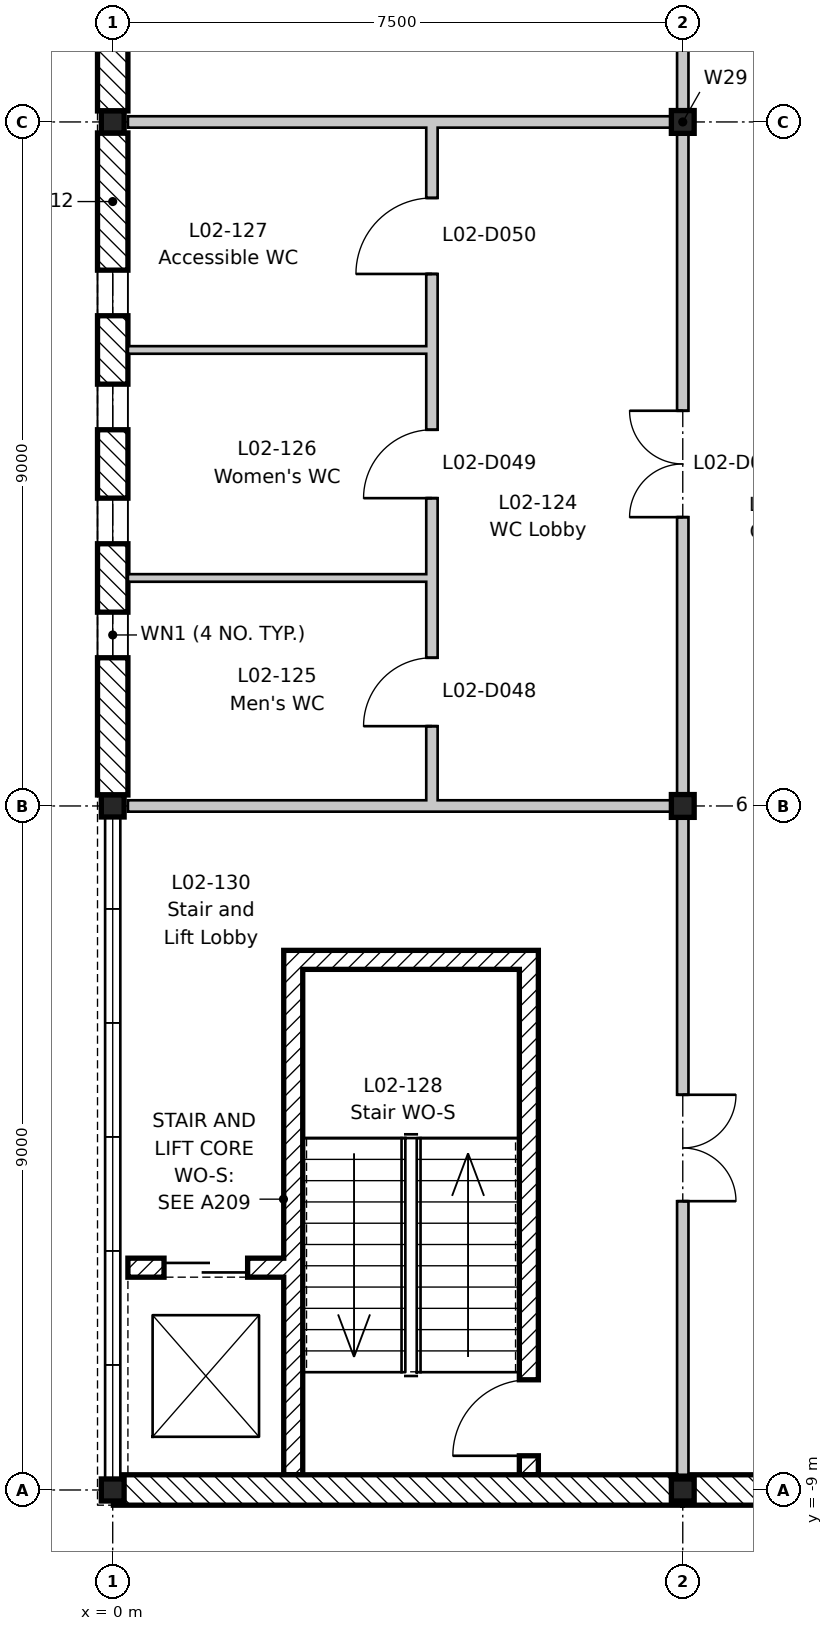
"""IFC4 building model, lengths in metres.
Left out: names, types, materials, properties, quantities, classifications, styles, units other than length and angle.
Written with IfcOpenShell. Run it as: python <this file> out.ifc"""

import sys

from ifc_helpers import new_model, si_unit, direction, frame, frame_2d, origin, origin_2d, place, context, subcontext, project, spatial, rectangle, i_section, extrude, element, fill, save


model = new_model("IFC4")
c1 = context("Model", 3, precision=1e-05, world=origin(), true_north=direction((0.0, 1.0)))
c2 = subcontext(c1, "Body", "Model", "MODEL_VIEW")
j1 = project(units=[si_unit("LENGTHUNIT", "METRE"), si_unit("PLANEANGLEUNIT", "RADIAN")], contexts=[c1])
p1 = place(None, origin())
s1 = spatial("IfcSite", under=j1, at=p1, CompositionType="ELEMENT")
p2 = place(p1, origin())
s2 = spatial("IfcBuilding", under=s1, at=p2, CompositionType="ELEMENT")
p3 = place(p2, frame((0.0, 0.0, 9.9)))
s3 = spatial("IfcBuildingStorey", under=s2, at=p3, CompositionType="ELEMENT", Elevation=9.9)
for number, where, z_axis, x_axis in (
    (1, (0.0, -9.0, -0.2), (0.0, 0.0, 1.0), (1.0, 0.0, 0.0)),
    (2, (0.0, 0.0, -0.2), (0.0, 0.0, 1.0), (1.0, 0.0, 0.0)),
    (3, (0.0, 9.0, -0.2), (0.0, 0.0, 1.0), (1.0, 0.0, 0.0)),
    (4, (7.5, -9.0, -0.2), (0.0, 0.0, 1.0), (1.0, 0.0, 0.0)),
):
    element("IfcColumn", number, at=place(p3, frame(where, z_axis=z_axis, x_axis=x_axis)), inside=s3, PredefinedType="COLUMN", context=c2, shape_type="SweptSolid", body=[
        extrude(i_section(OverallWidth=0.3, OverallDepth=0.29, WebThickness=0.009, FlangeThickness=0.014, FilletRadius=0.027, at=origin_2d()), origin(), (0.0, 0.0, 1.0), 4.5),
    ])
for number, where, z_axis, x_axis in (
    (5, (7.5, 0.0, -0.2), (0.0, 0.0, 1.0), (1.0, 0.0, 0.0)),
    (6, (7.5, 9.0, -0.2), (0.0, 0.0, 1.0), (1.0, 0.0, 0.0)),
):
    element("IfcColumn", number, at=place(p3, frame(where, z_axis=z_axis, x_axis=x_axis)), inside=s3, PredefinedType="COLUMN", context=c2, shape_type="SweptSolid", body=[
        extrude(i_section(OverallWidth=0.3, OverallDepth=0.3, WebThickness=0.011, FlangeThickness=0.019, FilletRadius=0.027, at=origin_2d()), origin(), (0.0, 0.0, 1.0), 4.5),
    ])
p4 = place(p3, frame((2.375, -8.8, 0.0), z_axis=(0.0, 0.0, 1.0), x_axis=(0.0, 1.0, 0.0)))
e7 = element("IfcWall", 7, at=p4, inside=s3, PredefinedType="SHEAR", context=c2, shape_type="SweptSolid", body=[
    extrude(rectangle(XDim=6.9, YDim=0.25, at=frame_2d((3.45, 0.0))), origin(), (0.0, 0.0, 1.0), 4.3),
])
p5 = place(p3, frame((5.475, -8.8, 0.0), z_axis=(0.0, 0.0, 1.0), x_axis=(0.0, 1.0, 0.0)))
e8 = element("IfcWall", 8, at=p5, inside=s3, PredefinedType="SHEAR", context=c2, shape_type="SweptSolid", body=[
    extrude(rectangle(XDim=6.9, YDim=0.25, at=frame_2d((3.45, 0.0))), origin(), (0.0, 0.0, 1.0), 4.3),
])
p6 = place(p5, frame((0.25, 0.0, 0.0)))
e9 = element("IfcOpeningElement", 9, at=p6, cuts=e8, PredefinedType="OPENING", context=c2, shape_type="SweptSolid", body=[
    extrude(rectangle(XDim=1.0, YDim=2.1, at=frame_2d((0.5, 1.05))), frame((0.0, 0.135, 0.0), z_axis=(0.0, -1.0, 0.0), x_axis=(1.0, 0.0, 0.0)), (0.0, 0.0, 1.0), 0.27),
])
p7 = place(p3, frame((2.5, -2.025, 0.0), z_axis=(0.0, 0.0, 1.0), x_axis=(1.0, 0.0, 0.0)))
e10 = element("IfcWall", 10, at=p7, inside=s3, PredefinedType="SHEAR", context=c2, shape_type="SweptSolid", body=[
    extrude(rectangle(XDim=2.85, YDim=0.25, at=frame_2d((1.425, 0.0))), origin(), (0.0, 0.0, 1.0), 4.3),
])
p8 = place(p3, frame((0.2, -6.075, 0.0), z_axis=(0.0, 0.0, 1.0), x_axis=(1.0, 0.0, 0.0)))
e11 = element("IfcWall", 11, at=p8, inside=s3, PredefinedType="SHEAR", context=c2, shape_type="SweptSolid", body=[
    extrude(rectangle(XDim=2.05, YDim=0.25, at=frame_2d((1.025, 0.0))), origin(), (0.0, 0.0, 1.0), 4.3),
])
p9 = place(p8, frame((0.475, 0.0, 0.0)))
e12 = element("IfcOpeningElement", 12, at=p9, cuts=e11, PredefinedType="OPENING", context=c2, shape_type="SweptSolid", body=[
    extrude(rectangle(XDim=1.1, YDim=2.1, at=frame_2d((0.55, 1.05))), frame((0.0, 0.135, 0.0), z_axis=(0.0, -1.0, 0.0), x_axis=(1.0, 0.0, 0.0)), (0.0, 0.0, 1.0), 0.27),
])
p10 = place(p3, frame((0.0, 0.145, 0.0), z_axis=(0.0, 0.0, 1.0), x_axis=(0.0, 1.0, 0.0)))
e13 = element("IfcWall", 13, at=p10, inside=s3, PredefinedType="STANDARD", context=c2, shape_type="SweptSolid", body=[
    extrude(rectangle(XDim=8.71, YDim=0.4, at=frame_2d((4.355, 0.0))), origin(), (0.0, 0.0, 1.0), 3.9),
])
p11 = place(p10, frame((1.805, 0.0, 1.5)))
e14 = element("IfcOpeningElement", 14, at=p11, cuts=e13, PredefinedType="OPENING", context=c2, shape_type="SweptSolid", body=[
    extrude(rectangle(XDim=0.6, YDim=1.2, at=frame_2d((0.3, 0.6))), frame((0.0, 0.21, 0.0), z_axis=(0.0, -1.0, 0.0), x_axis=(1.0, 0.0, 0.0)), (0.0, 0.0, 1.0), 0.42),
])
p12 = place(p10, frame((3.305, 0.0, 1.5)))
e15 = element("IfcOpeningElement", 15, at=p12, cuts=e13, PredefinedType="OPENING", context=c2, shape_type="SweptSolid", body=[
    extrude(rectangle(XDim=0.6, YDim=1.2, at=frame_2d((0.3, 0.6))), frame((0.0, 0.21, 0.0), z_axis=(0.0, -1.0, 0.0), x_axis=(1.0, 0.0, 0.0)), (0.0, 0.0, 1.0), 0.42),
])
p13 = place(p10, frame((4.805, 0.0, 1.5)))
e16 = element("IfcOpeningElement", 16, at=p13, cuts=e13, PredefinedType="OPENING", context=c2, shape_type="SweptSolid", body=[
    extrude(rectangle(XDim=0.6, YDim=1.2, at=frame_2d((0.3, 0.6))), frame((0.0, 0.21, 0.0), z_axis=(0.0, -1.0, 0.0), x_axis=(1.0, 0.0, 0.0)), (0.0, 0.0, 1.0), 0.42),
])
p14 = place(p10, frame((6.305, 0.0, 1.5)))
e17 = element("IfcOpeningElement", 17, at=p14, cuts=e13, PredefinedType="OPENING", context=c2, shape_type="SweptSolid", body=[
    extrude(rectangle(XDim=0.6, YDim=1.2, at=frame_2d((0.3, 0.6))), frame((0.0, 0.21, 0.0), z_axis=(0.0, -1.0, 0.0), x_axis=(1.0, 0.0, 0.0)), (0.0, 0.0, 1.0), 0.42),
])
p15 = place(p3, frame((0.0, 9.145, 0.0), z_axis=(0.0, 0.0, 1.0), x_axis=(0.0, 1.0, 0.0)))
e18 = element("IfcWall", 18, at=p15, inside=s3, PredefinedType="STANDARD", context=c2, shape_type="SweptSolid", body=[
    extrude(rectangle(XDim=8.71, YDim=0.4, at=frame_2d((4.355, 0.0))), origin(), (0.0, 0.0, 1.0), 3.9),
])
p16 = place(p15, frame((1.505, 0.0, 0.6)))
e19 = element("IfcOpeningElement", 19, at=p16, cuts=e18, PredefinedType="OPENING", context=c2, shape_type="SweptSolid", body=[
    extrude(rectangle(XDim=1.2, YDim=3.0, at=frame_2d((0.6, 1.5))), frame((0.0, 0.21, 0.0), z_axis=(0.0, -1.0, 0.0), x_axis=(1.0, 0.0, 0.0)), (0.0, 0.0, 1.0), 0.42),
])
p17 = place(p15, frame((3.005, 0.0, 0.6)))
e20 = element("IfcOpeningElement", 20, at=p17, cuts=e18, PredefinedType="OPENING", context=c2, shape_type="SweptSolid", body=[
    extrude(rectangle(XDim=1.2, YDim=3.0, at=frame_2d((0.6, 1.5))), frame((0.0, 0.21, 0.0), z_axis=(0.0, -1.0, 0.0), x_axis=(1.0, 0.0, 0.0)), (0.0, 0.0, 1.0), 0.42),
])
p18 = place(p15, frame((4.505, 0.0, 0.6)))
e21 = element("IfcOpeningElement", 21, at=p18, cuts=e18, PredefinedType="OPENING", context=c2, shape_type="SweptSolid", body=[
    extrude(rectangle(XDim=1.2, YDim=3.0, at=frame_2d((0.6, 1.5))), frame((0.0, 0.21, 0.0), z_axis=(0.0, -1.0, 0.0), x_axis=(1.0, 0.0, 0.0)), (0.0, 0.0, 1.0), 0.42),
])
p19 = place(p15, frame((6.005, 0.0, 0.6)))
e22 = element("IfcOpeningElement", 22, at=p19, cuts=e18, PredefinedType="OPENING", context=c2, shape_type="SweptSolid", body=[
    extrude(rectangle(XDim=1.2, YDim=3.0, at=frame_2d((0.6, 1.5))), frame((0.0, 0.21, 0.0), z_axis=(0.0, -1.0, 0.0), x_axis=(1.0, 0.0, 0.0)), (0.0, 0.0, 1.0), 0.42),
])
p20 = place(p3, frame((7.491, -9.0, 0.0), z_axis=(0.0, 0.0, 1.0), x_axis=(-1.0, 0.0, 0.0)))
e23 = element("IfcWall", 23, at=p20, inside=s3, PredefinedType="STANDARD", context=c2, shape_type="SweptSolid", body=[
    extrude(rectangle(XDim=7.481, YDim=0.4, at=frame_2d((3.741, 0.0))), origin(), (0.0, 0.0, 1.0), 3.97),
])
p21 = place(p3, frame((10.491, -9.0, 0.0), z_axis=(0.0, 0.0, 1.0), x_axis=(-1.0, 0.0, 0.0)))
e24 = element("IfcWall", 24, at=p21, inside=s3, PredefinedType="STANDARD", context=c2, shape_type="SweptSolid", body=[
    extrude(rectangle(XDim=2.981, YDim=0.4, at=frame_2d((1.491, 0.0))), origin(), (0.0, 0.0, 1.0), 4.1),
])
for number, where, z_axis, x_axis in (
    (25, (0.2, 9.0, 0.0), (0.0, 0.0, 1.0), (1.0, 0.0, 0.0)),
    (26, (0.2, 0.0, 0.0), (0.0, 0.0, 1.0), (1.0, 0.0, 0.0)),
):
    element("IfcWall", number, at=place(p3, frame(where, z_axis=z_axis, x_axis=x_axis)), inside=s3, PredefinedType="PARTITIONING", context=c2, shape_type="SweptSolid", body=[
        extrude(rectangle(XDim=7.225, YDim=0.15, at=frame_2d((3.613, 0.0))), origin(), (0.0, 0.0, 1.0), 3.95),
    ])
p22 = place(p3, frame((7.5, -8.8, 0.0), z_axis=(0.0, 0.0, 1.0), x_axis=(0.0, 1.0, 0.0)))
e27 = element("IfcWall", 27, at=p22, inside=s3, PredefinedType="PARTITIONING", context=c2, shape_type="SweptSolid", body=[
    extrude(rectangle(XDim=79.3, YDim=0.15, at=frame_2d((39.65, 0.0))), origin(), (0.0, 0.0, 1.0), 3.78),
])
p23 = place(p22, frame((21.6, 0.0, 0.0)))
e28 = element("IfcOpeningElement", 28, at=p23, cuts=e27, PredefinedType="OPENING", context=c2, shape_type="SweptSolid", body=[
    extrude(rectangle(XDim=1.4, YDim=2.1, at=frame_2d((0.7, 1.05))), frame((0.0, 0.085, 0.0), z_axis=(0.0, -1.0, 0.0), x_axis=(1.0, 0.0, 0.0)), (0.0, 0.0, 1.0), 0.17),
])
p24 = place(p22, frame((29.3, 0.0, 0.0)))
e29 = element("IfcOpeningElement", 29, at=p24, cuts=e27, PredefinedType="OPENING", context=c2, shape_type="SweptSolid", body=[
    extrude(rectangle(XDim=1.0, YDim=2.1, at=frame_2d((0.5, 1.05))), frame((0.0, 0.085, 0.0), z_axis=(0.0, -1.0, 0.0), x_axis=(1.0, 0.0, 0.0)), (0.0, 0.0, 1.0), 0.17),
])
p25 = place(p22, frame((33.8, 0.0, 0.0)))
e30 = element("IfcOpeningElement", 30, at=p25, cuts=e27, PredefinedType="OPENING", context=c2, shape_type="SweptSolid", body=[
    extrude(rectangle(XDim=1.0, YDim=2.1, at=frame_2d((0.5, 1.05))), frame((0.0, 0.085, 0.0), z_axis=(0.0, -1.0, 0.0), x_axis=(1.0, 0.0, 0.0)), (0.0, 0.0, 1.0), 0.17),
])
p26 = place(p22, frame((48.6, 0.0, 0.0)))
e31 = element("IfcOpeningElement", 31, at=p26, cuts=e27, PredefinedType="OPENING", context=c2, shape_type="SweptSolid", body=[
    extrude(rectangle(XDim=1.4, YDim=2.1, at=frame_2d((0.7, 1.05))), frame((0.0, 0.085, 0.0), z_axis=(0.0, -1.0, 0.0), x_axis=(1.0, 0.0, 0.0)), (0.0, 0.0, 1.0), 0.17),
])
p27 = place(p22, frame((56.3, 0.0, 0.0)))
e32 = element("IfcOpeningElement", 32, at=p27, cuts=e27, PredefinedType="OPENING", context=c2, shape_type="SweptSolid", body=[
    extrude(rectangle(XDim=1.0, YDim=2.1, at=frame_2d((0.5, 1.05))), frame((0.0, 0.085, 0.0), z_axis=(0.0, -1.0, 0.0), x_axis=(1.0, 0.0, 0.0)), (0.0, 0.0, 1.0), 0.17),
])
p28 = place(p22, frame((60.8, 0.0, 0.0)))
e33 = element("IfcOpeningElement", 33, at=p28, cuts=e27, PredefinedType="OPENING", context=c2, shape_type="SweptSolid", body=[
    extrude(rectangle(XDim=1.0, YDim=2.1, at=frame_2d((0.5, 1.05))), frame((0.0, 0.085, 0.0), z_axis=(0.0, -1.0, 0.0), x_axis=(1.0, 0.0, 0.0)), (0.0, 0.0, 1.0), 0.17),
])
p29 = place(p22, frame((12.6, 0.0, 0.0)))
e34 = element("IfcOpeningElement", 34, at=p29, cuts=e27, PredefinedType="OPENING", context=c2, shape_type="SweptSolid", body=[
    extrude(rectangle(XDim=1.4, YDim=2.1, at=frame_2d((0.7, 1.05))), frame((0.0, 0.085, 0.0), z_axis=(0.0, -1.0, 0.0), x_axis=(1.0, 0.0, 0.0)), (0.0, 0.0, 1.0), 0.17),
])
p30 = place(p22, frame((3.6, 0.0, 0.0)))
e35 = element("IfcOpeningElement", 35, at=p30, cuts=e27, PredefinedType="OPENING", context=c2, shape_type="SweptSolid", body=[
    extrude(rectangle(XDim=1.4, YDim=2.1, at=frame_2d((0.7, 1.05))), frame((0.0, 0.085, 0.0), z_axis=(0.0, -1.0, 0.0), x_axis=(1.0, 0.0, 0.0)), (0.0, 0.0, 1.0), 0.17),
])
p31 = place(p22, frame((63.55, 0.0, 0.0)))
e36 = element("IfcOpeningElement", 36, at=p31, cuts=e27, PredefinedType="OPENING", context=c2, shape_type="SweptSolid", body=[
    extrude(rectangle(XDim=1.4, YDim=2.1, at=frame_2d((0.7, 1.05))), frame((0.0, 0.085, 0.0), z_axis=(0.0, -1.0, 0.0), x_axis=(1.0, 0.0, 0.0)), (0.0, 0.0, 1.0), 0.17),
])
p32 = place(p22, frame((69.6, 0.0, 0.0)))
e37 = element("IfcOpeningElement", 37, at=p32, cuts=e27, PredefinedType="OPENING", context=c2, shape_type="SweptSolid", body=[
    extrude(rectangle(XDim=1.4, YDim=2.1, at=frame_2d((0.7, 1.05))), frame((0.0, 0.085, 0.0), z_axis=(0.0, -1.0, 0.0), x_axis=(1.0, 0.0, 0.0)), (0.0, 0.0, 1.0), 0.17),
])
p33 = place(p22, frame((42.85, 0.0, 0.0)))
e38 = element("IfcOpeningElement", 38, at=p33, cuts=e27, PredefinedType="OPENING", context=c2, shape_type="SweptSolid", body=[
    extrude(rectangle(XDim=1.0, YDim=2.1, at=frame_2d((0.5, 1.05))), frame((0.0, 0.085, 0.0), z_axis=(0.0, -1.0, 0.0), x_axis=(1.0, 0.0, 0.0)), (0.0, 0.0, 1.0), 0.17),
])
p34 = place(p22, frame((36.55, 0.0, 0.0)))
e39 = element("IfcOpeningElement", 39, at=p34, cuts=e27, PredefinedType="OPENING", context=c2, shape_type="SweptSolid", body=[
    extrude(rectangle(XDim=1.4, YDim=2.1, at=frame_2d((0.7, 1.05))), frame((0.0, 0.085, 0.0), z_axis=(0.0, -1.0, 0.0), x_axis=(1.0, 0.0, 0.0)), (0.0, 0.0, 1.0), 0.17),
])
p35 = place(p22, frame((72.8, 0.0, 0.0)))
e40 = element("IfcOpeningElement", 40, at=p35, cuts=e27, PredefinedType="OPENING", context=c2, shape_type="SweptSolid", body=[
    extrude(rectangle(XDim=1.0, YDim=2.1, at=frame_2d((0.5, 1.05))), frame((0.0, 0.085, 0.0), z_axis=(0.0, -1.0, 0.0), x_axis=(1.0, 0.0, 0.0)), (0.0, 0.0, 1.0), 0.17),
])
p36 = place(p3, frame((4.2, 0.075, 0.0), z_axis=(0.0, 0.0, 1.0), x_axis=(0.0, 1.0, 0.0)))
e41 = element("IfcWall", 41, at=p36, inside=s3, PredefinedType="PARTITIONING", context=c2, shape_type="SweptSolid", body=[
    extrude(rectangle(XDim=8.85, YDim=0.15, at=frame_2d((4.425, 0.0))), origin(), (0.0, 0.0, 1.0), 4.3),
])
p37 = place(p36, frame((0.975, 0.0, 0.0)))
e42 = element("IfcOpeningElement", 42, at=p37, cuts=e41, PredefinedType="OPENING", context=c2, shape_type="SweptSolid", body=[
    extrude(rectangle(XDim=0.9, YDim=2.1, at=frame_2d((0.45, 1.05))), frame((0.0, 0.085, 0.0), z_axis=(0.0, -1.0, 0.0), x_axis=(1.0, 0.0, 0.0)), (0.0, 0.0, 1.0), 0.17),
])
p38 = place(p36, frame((3.975, 0.0, 0.0)))
e43 = element("IfcOpeningElement", 43, at=p38, cuts=e41, PredefinedType="OPENING", context=c2, shape_type="SweptSolid", body=[
    extrude(rectangle(XDim=0.9, YDim=2.1, at=frame_2d((0.45, 1.05))), frame((0.0, 0.085, 0.0), z_axis=(0.0, -1.0, 0.0), x_axis=(1.0, 0.0, 0.0)), (0.0, 0.0, 1.0), 0.17),
])
p39 = place(p36, frame((6.925, 0.0, 0.0)))
e44 = element("IfcOpeningElement", 44, at=p39, cuts=e41, PredefinedType="OPENING", context=c2, shape_type="SweptSolid", body=[
    extrude(rectangle(XDim=1.0, YDim=2.1, at=frame_2d((0.5, 1.05))), frame((0.0, 0.085, 0.0), z_axis=(0.0, -1.0, 0.0), x_axis=(1.0, 0.0, 0.0)), (0.0, 0.0, 1.0), 0.17),
])
for number, where, z_axis, x_axis in (
    (45, (0.2, 3.0, 0.0), (0.0, 0.0, 1.0), (1.0, 0.0, 0.0)),
    (46, (0.2, 6.0, 0.0), (0.0, 0.0, 1.0), (1.0, 0.0, 0.0)),
):
    element("IfcWall", number, at=place(p3, frame(where, z_axis=z_axis, x_axis=x_axis)), inside=s3, PredefinedType="PARTITIONING", context=c2, shape_type="SweptSolid", body=[
        extrude(rectangle(XDim=3.925, YDim=0.1, at=frame_2d((1.962, 0.0))), origin(), (0.0, 0.0, 1.0), 4.3),
    ])
p40 = place(p11, origin())
e47 = element("IfcWindow", 47, at=p40, inside=s3, PartitioningType="SINGLE_PANEL", PredefinedType="WINDOW", context=c2, shape_type="SweptSolid", body=[
    extrude(rectangle(XDim=0.6, YDim=1.2, at=frame_2d((0.3, 0.6))), frame((0.0, 0.03, 0.0), z_axis=(0.0, -1.0, 0.0), x_axis=(1.0, 0.0, 0.0)), (0.0, 0.0, 1.0), 0.06),
])
fill(e14, e47)
p41 = place(p12, origin())
e48 = element("IfcWindow", 48, at=p41, inside=s3, PartitioningType="SINGLE_PANEL", PredefinedType="WINDOW", context=c2, shape_type="SweptSolid", body=[
    extrude(rectangle(XDim=0.6, YDim=1.2, at=frame_2d((0.3, 0.6))), frame((0.0, 0.03, 0.0), z_axis=(0.0, -1.0, 0.0), x_axis=(1.0, 0.0, 0.0)), (0.0, 0.0, 1.0), 0.06),
])
fill(e15, e48)
p42 = place(p13, origin())
e49 = element("IfcWindow", 49, at=p42, inside=s3, PartitioningType="SINGLE_PANEL", PredefinedType="WINDOW", context=c2, shape_type="SweptSolid", body=[
    extrude(rectangle(XDim=0.6, YDim=1.2, at=frame_2d((0.3, 0.6))), frame((0.0, 0.03, 0.0), z_axis=(0.0, -1.0, 0.0), x_axis=(1.0, 0.0, 0.0)), (0.0, 0.0, 1.0), 0.06),
])
fill(e16, e49)
p43 = place(p14, origin())
e50 = element("IfcWindow", 50, at=p43, inside=s3, PartitioningType="SINGLE_PANEL", PredefinedType="WINDOW", context=c2, shape_type="SweptSolid", body=[
    extrude(rectangle(XDim=0.6, YDim=1.2, at=frame_2d((0.3, 0.6))), frame((0.0, 0.03, 0.0), z_axis=(0.0, -1.0, 0.0), x_axis=(1.0, 0.0, 0.0)), (0.0, 0.0, 1.0), 0.06),
])
fill(e17, e50)
p44 = place(p29, origin())
e51 = element("IfcDoor", 51, at=p44, inside=s3, OperationType="DOUBLE_DOOR_SINGLE_SWING", PredefinedType="DOOR", context=c2, shape_type="SweptSolid", body=[
    extrude(rectangle(XDim=1.4, YDim=2.1, at=frame_2d((0.7, 1.05))), frame((0.0, 0.025, 0.0), z_axis=(0.0, -1.0, 0.0), x_axis=(1.0, 0.0, 0.0)), (0.0, 0.0, 1.0), 0.05),
])
fill(e34, e51)
p45 = place(p37, origin())
e52 = element("IfcDoor", 52, at=p45, inside=s3, OperationType="SINGLE_SWING_LEFT", PredefinedType="DOOR", context=c2, shape_type="SweptSolid", body=[
    extrude(rectangle(XDim=0.9, YDim=2.1, at=frame_2d((0.45, 1.05))), frame((0.0, 0.025, 0.0), z_axis=(0.0, -1.0, 0.0), x_axis=(1.0, 0.0, 0.0)), (0.0, 0.0, 1.0), 0.05),
])
fill(e42, e52)
p46 = place(p38, origin())
e53 = element("IfcDoor", 53, at=p46, inside=s3, OperationType="SINGLE_SWING_LEFT", PredefinedType="DOOR", context=c2, shape_type="SweptSolid", body=[
    extrude(rectangle(XDim=0.9, YDim=2.1, at=frame_2d((0.45, 1.05))), frame((0.0, 0.025, 0.0), z_axis=(0.0, -1.0, 0.0), x_axis=(1.0, 0.0, 0.0)), (0.0, 0.0, 1.0), 0.05),
])
fill(e43, e53)
p47 = place(p39, origin())
e54 = element("IfcDoor", 54, at=p47, inside=s3, OperationType="SINGLE_SWING_LEFT", PredefinedType="DOOR", context=c2, shape_type="SweptSolid", body=[
    extrude(rectangle(XDim=1.0, YDim=2.1, at=frame_2d((0.5, 1.05))), frame((0.0, 0.025, 0.0), z_axis=(0.0, -1.0, 0.0), x_axis=(1.0, 0.0, 0.0)), (0.0, 0.0, 1.0), 0.05),
])
fill(e44, e54)
p48 = place(p6, origin())
e55 = element("IfcDoor", 55, at=p48, inside=s3, OperationType="SINGLE_SWING_LEFT", PredefinedType="DOOR", context=c2, shape_type="SweptSolid", body=[
    extrude(rectangle(XDim=1.0, YDim=2.1, at=frame_2d((0.5, 1.05))), frame((0.0, 0.025, 0.0), z_axis=(0.0, -1.0, 0.0), x_axis=(1.0, 0.0, 0.0)), (0.0, 0.0, 1.0), 0.05),
])
fill(e9, e55)
p49 = place(p30, frame((1.4, 0.0, 0.0), z_axis=(0.0, 0.0, 1.0), x_axis=(-1.0, 0.0, 0.0)))
e56 = element("IfcDoor", 56, at=p49, inside=s3, OperationType="DOUBLE_DOOR_SINGLE_SWING", PredefinedType="DOOR", context=c2, shape_type="SweptSolid", body=[
    extrude(rectangle(XDim=1.4, YDim=2.1, at=frame_2d((0.7, 1.05))), frame((0.0, 0.025, 0.0), z_axis=(0.0, -1.0, 0.0), x_axis=(1.0, 0.0, 0.0)), (0.0, 0.0, 1.0), 0.05),
])
fill(e35, e56)
p50 = place(p9, origin())
e57 = element("IfcDoor", 57, at=p50, inside=s3, OperationType="SLIDING_TO_LEFT", PredefinedType="DOOR", context=c2, shape_type="SweptSolid", body=[
    extrude(rectangle(XDim=1.1, YDim=2.1, at=frame_2d((0.55, 1.05))), frame((0.0, 0.025, 0.0), z_axis=(0.0, -1.0, 0.0), x_axis=(1.0, 0.0, 0.0)), (0.0, 0.0, 1.0), 0.05),
])
fill(e12, e57)
save(model, sys.argv[1])
